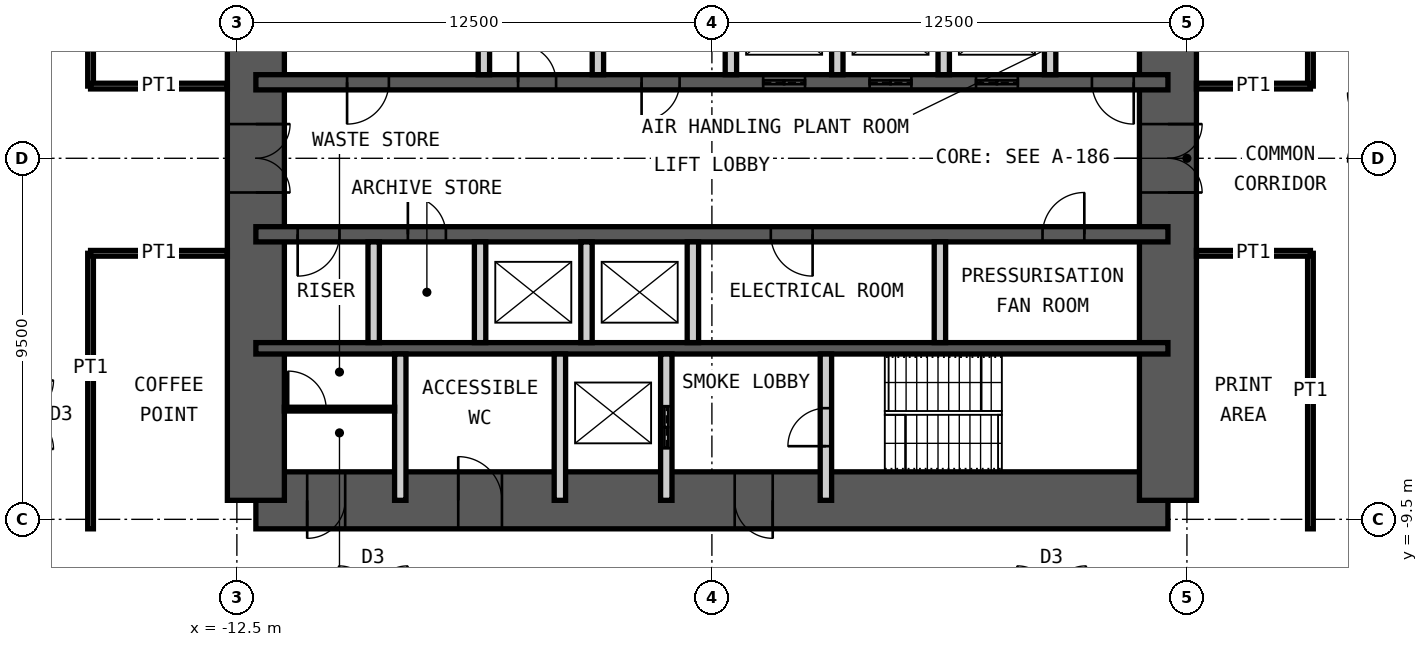
"""IFC4 building model, lengths in metres.
Left out: names, types, materials, properties, quantities, classifications, styles, units other than length and angle.
Written with IfcOpenShell. Run it as: python <this file> out.ifc"""

import sys

from ifc_helpers import new_model, si_unit, direction, frame, frame_2d, origin, place, context, subcontext, project, spatial, rectangle, extrude, element, fill, save


model = new_model("IFC4")
c1 = context("Model", 3, precision=1e-05, world=origin(), true_north=direction((0.0, 1.0)))
c2 = subcontext(c1, "Body", "Model", "MODEL_VIEW")
j1 = project(units=[si_unit("LENGTHUNIT", "METRE"), si_unit("PLANEANGLEUNIT", "RADIAN")], contexts=[c1])
p1 = place(None, origin())
s1 = spatial("IfcSite", under=j1, at=p1, CompositionType="ELEMENT")
p2 = place(p1, origin())
s2 = spatial("IfcBuilding", under=s1, at=p2, CompositionType="ELEMENT")
p3 = place(p2, frame((0.0, 0.0, 145.0)))
s3 = spatial("IfcBuildingStorey", under=s2, at=p3, CompositionType="ELEMENT", Elevation=145.0)
p4 = place(p3, frame((-12.0, -9.0, 0.0), z_axis=(0.0, 0.0, 1.0), x_axis=(1.0, 0.0, 0.0)))
e1 = element("IfcWall", 1, at=p4, inside=s3, PredefinedType="SHEAR", context=c2, shape_type="SweptSolid", body=[
    extrude(rectangle(XDim=24.0, YDim=1.5, at=frame_2d((12.0, 0.0))), origin(), (0.0, 0.0, 1.0), 4.2),
])
p5 = place(p4, frame((1.35, 0.0, 0.0)))
e2 = element("IfcOpeningElement", 2, at=p5, cuts=e1, PredefinedType="OPENING", context=c2, shape_type="SweptSolid", body=[
    extrude(rectangle(XDim=1.0, YDim=2.1, at=frame_2d((0.5, 1.05))), frame((0.0, 0.76, 0.0), z_axis=(0.0, -1.0, 0.0), x_axis=(1.0, 0.0, 0.0)), (0.0, 0.0, 1.0), 1.52),
])
p6 = place(p4, frame((5.325, 0.0, 0.0)))
e3 = element("IfcOpeningElement", 3, at=p6, cuts=e1, PredefinedType="OPENING", context=c2, shape_type="SweptSolid", body=[
    extrude(rectangle(XDim=1.15, YDim=2.1, at=frame_2d((0.575, 1.05))), frame((0.0, 0.76, 0.0), z_axis=(0.0, -1.0, 0.0), x_axis=(1.0, 0.0, 0.0)), (0.0, 0.0, 1.0), 1.52),
])
p7 = place(p4, frame((12.6, 0.0, 0.0)))
e4 = element("IfcOpeningElement", 4, at=p7, cuts=e1, PredefinedType="OPENING", context=c2, shape_type="SweptSolid", body=[
    extrude(rectangle(XDim=1.0, YDim=2.1, at=frame_2d((0.5, 1.05))), frame((0.0, 0.76, 0.0), z_axis=(0.0, -1.0, 0.0), x_axis=(1.0, 0.0, 0.0)), (0.0, 0.0, 1.0), 1.52),
])
p8 = place(p3, frame((12.0, -9.0, 0.0), z_axis=(0.0, 0.0, 1.0), x_axis=(0.0, 1.0, 0.0)))
e5 = element("IfcWall", 5, at=p8, inside=s3, PredefinedType="SHEAR", context=c2, shape_type="SweptSolid", body=[
    extrude(rectangle(XDim=18.0, YDim=1.5, at=frame_2d((9.0, 0.0))), origin(), (0.0, 0.0, 1.0), 4.2),
])
p9 = place(p8, frame((8.1, 0.0, 0.0)))
e6 = element("IfcOpeningElement", 6, at=p9, cuts=e5, PredefinedType="OPENING", context=c2, shape_type="SweptSolid", body=[
    extrude(rectangle(XDim=1.8, YDim=2.1, at=frame_2d((0.9, 1.05))), frame((0.0, 0.76, 0.0), z_axis=(0.0, -1.0, 0.0), x_axis=(1.0, 0.0, 0.0)), (0.0, 0.0, 1.0), 1.52),
])
p10 = place(p3, frame((-12.0, -9.0, 0.0), z_axis=(0.0, 0.0, 1.0), x_axis=(0.0, 1.0, 0.0)))
e7 = element("IfcWall", 7, at=p10, inside=s3, PredefinedType="SHEAR", context=c2, shape_type="SweptSolid", body=[
    extrude(rectangle(XDim=18.0, YDim=1.5, at=frame_2d((9.0, 0.0))), origin(), (0.0, 0.0, 1.0), 4.2),
])
p11 = place(p10, frame((8.1, 0.0, 0.0)))
e8 = element("IfcOpeningElement", 8, at=p11, cuts=e7, PredefinedType="OPENING", context=c2, shape_type="SweptSolid", body=[
    extrude(rectangle(XDim=1.8, YDim=2.1, at=frame_2d((0.9, 1.05))), frame((0.0, 0.76, 0.0), z_axis=(0.0, -1.0, 0.0), x_axis=(1.0, 0.0, 0.0)), (0.0, 0.0, 1.0), 1.52),
])
p12 = place(p3, frame((-12.0, 2.0, 0.0), z_axis=(0.0, 0.0, 1.0), x_axis=(1.0, 0.0, 0.0)))
e9 = element("IfcWall", 9, at=p12, inside=s3, PredefinedType="SHEAR", context=c2, shape_type="SweptSolid", body=[
    extrude(rectangle(XDim=24.0, YDim=0.4, at=frame_2d((12.0, 0.0))), origin(), (0.0, 0.0, 1.0), 4.2),
])
p13 = place(p12, frame((2.4, 0.0, 0.0)))
e10 = element("IfcOpeningElement", 10, at=p13, cuts=e9, PredefinedType="OPENING", context=c2, shape_type="SweptSolid", body=[
    extrude(rectangle(XDim=1.1, YDim=2.1, at=frame_2d((0.55, 1.05))), frame((0.0, 0.21, 0.0), z_axis=(0.0, -1.0, 0.0), x_axis=(1.0, 0.0, 0.0)), (0.0, 0.0, 1.0), 0.42),
])
p14 = place(p12, frame((22.0, 0.0, 0.0)))
e11 = element("IfcOpeningElement", 11, at=p14, cuts=e9, PredefinedType="OPENING", context=c2, shape_type="SweptSolid", body=[
    extrude(rectangle(XDim=1.1, YDim=2.1, at=frame_2d((0.55, 1.05))), frame((0.0, 0.21, 0.0), z_axis=(0.0, -1.0, 0.0), x_axis=(1.0, 0.0, 0.0)), (0.0, 0.0, 1.0), 0.42),
])
p15 = place(p12, frame((10.15, 0.0, 0.0)))
e12 = element("IfcOpeningElement", 12, at=p15, cuts=e9, PredefinedType="OPENING", context=c2, shape_type="SweptSolid", body=[
    extrude(rectangle(XDim=1.0, YDim=2.1, at=frame_2d((0.5, 1.05))), frame((0.0, 0.21, 0.0), z_axis=(0.0, -1.0, 0.0), x_axis=(1.0, 0.0, 0.0)), (0.0, 0.0, 1.0), 0.42),
])
p16 = place(p12, frame((6.9, 0.0, 0.0)))
e13 = element("IfcOpeningElement", 13, at=p16, cuts=e9, PredefinedType="OPENING", context=c2, shape_type="SweptSolid", body=[
    extrude(rectangle(XDim=1.0, YDim=2.1, at=frame_2d((0.5, 1.05))), frame((0.0, 0.21, 0.0), z_axis=(0.0, -1.0, 0.0), x_axis=(1.0, 0.0, 0.0)), (0.0, 0.0, 1.0), 0.42),
])
p17 = place(p12, frame((13.35, 0.0, 0.0)))
e14 = element("IfcOpeningElement", 14, at=p17, cuts=e9, PredefinedType="OPENING", context=c2, shape_type="SweptSolid", body=[
    extrude(rectangle(XDim=1.1, YDim=2.4, at=frame_2d((0.55, 1.2))), frame((0.0, 0.21, 0.0), z_axis=(0.0, -1.0, 0.0), x_axis=(1.0, 0.0, 0.0)), (0.0, 0.0, 1.0), 0.42),
])
p18 = place(p12, frame((16.15, 0.0, 0.0)))
e15 = element("IfcOpeningElement", 15, at=p18, cuts=e9, PredefinedType="OPENING", context=c2, shape_type="SweptSolid", body=[
    extrude(rectangle(XDim=1.1, YDim=2.4, at=frame_2d((0.55, 1.2))), frame((0.0, 0.21, 0.0), z_axis=(0.0, -1.0, 0.0), x_axis=(1.0, 0.0, 0.0)), (0.0, 0.0, 1.0), 0.42),
])
p19 = place(p12, frame((18.95, 0.0, 0.0)))
e16 = element("IfcOpeningElement", 16, at=p19, cuts=e9, PredefinedType="OPENING", context=c2, shape_type="SweptSolid", body=[
    extrude(rectangle(XDim=1.1, YDim=2.4, at=frame_2d((0.55, 1.2))), frame((0.0, 0.21, 0.0), z_axis=(0.0, -1.0, 0.0), x_axis=(1.0, 0.0, 0.0)), (0.0, 0.0, 1.0), 0.42),
])
p20 = place(p3, frame((-12.0, -2.0, 0.0), z_axis=(0.0, 0.0, 1.0), x_axis=(1.0, 0.0, 0.0)))
e17 = element("IfcWall", 17, at=p20, inside=s3, PredefinedType="SHEAR", context=c2, shape_type="SweptSolid", body=[
    extrude(rectangle(XDim=24.0, YDim=0.4, at=frame_2d((12.0, 0.0))), origin(), (0.0, 0.0, 1.0), 4.2),
])
p21 = place(p20, frame((1.1, 0.0, 0.0)))
e18 = element("IfcOpeningElement", 18, at=p21, cuts=e17, PredefinedType="OPENING", context=c2, shape_type="SweptSolid", body=[
    extrude(rectangle(XDim=1.1, YDim=2.1, at=frame_2d((0.55, 1.05))), frame((0.0, 0.21, 0.0), z_axis=(0.0, -1.0, 0.0), x_axis=(1.0, 0.0, 0.0)), (0.0, 0.0, 1.0), 0.42),
])
p22 = place(p20, frame((13.55, 0.0, 0.0)))
e19 = element("IfcOpeningElement", 19, at=p22, cuts=e17, PredefinedType="OPENING", context=c2, shape_type="SweptSolid", body=[
    extrude(rectangle(XDim=1.1, YDim=2.1, at=frame_2d((0.55, 1.05))), frame((0.0, 0.21, 0.0), z_axis=(0.0, -1.0, 0.0), x_axis=(1.0, 0.0, 0.0)), (0.0, 0.0, 1.0), 0.42),
])
p23 = place(p20, frame((20.7, 0.0, 0.0)))
e20 = element("IfcOpeningElement", 20, at=p23, cuts=e17, PredefinedType="OPENING", context=c2, shape_type="SweptSolid", body=[
    extrude(rectangle(XDim=1.1, YDim=2.1, at=frame_2d((0.55, 1.05))), frame((0.0, 0.21, 0.0), z_axis=(0.0, -1.0, 0.0), x_axis=(1.0, 0.0, 0.0)), (0.0, 0.0, 1.0), 0.42),
])
p24 = place(p20, frame((4.0, 0.0, 0.0)))
e21 = element("IfcOpeningElement", 21, at=p24, cuts=e17, PredefinedType="OPENING", context=c2, shape_type="SweptSolid", body=[
    extrude(rectangle(XDim=1.0, YDim=2.1, at=frame_2d((0.5, 1.05))), frame((0.0, 0.21, 0.0), z_axis=(0.0, -1.0, 0.0), x_axis=(1.0, 0.0, 0.0)), (0.0, 0.0, 1.0), 0.42),
])
p25 = place(p3, frame((-12.0, -5.0, 0.0), z_axis=(0.0, 0.0, 1.0), x_axis=(1.0, 0.0, 0.0)))
e22 = element("IfcWall", 22, at=p25, inside=s3, PredefinedType="SHEAR", context=c2, shape_type="SweptSolid", body=[
    extrude(rectangle(XDim=24.0, YDim=0.3, at=frame_2d((12.0, 0.0))), origin(), (0.0, 0.0, 1.0), 4.2),
])
for number, where, z_axis, x_axis in (
    (23, (-6.0, 2.2, 0.0), (0.0, 0.0, 1.0), (0.0, 1.0, 0.0)),
    (24, (-3.0, 2.2, 0.0), (0.0, 0.0, 1.0), (0.0, 1.0, 0.0)),
    (25, (0.5, 2.2, 0.0), (0.0, 0.0, 1.0), (0.0, 1.0, 0.0)),
    (26, (3.3, 2.2, 0.0), (0.0, 0.0, 1.0), (0.0, 1.0, 0.0)),
    (27, (6.1, 2.2, 0.0), (0.0, 0.0, 1.0), (0.0, 1.0, 0.0)),
    (28, (8.9, 2.2, 0.0), (0.0, 0.0, 1.0), (0.0, 1.0, 0.0)),
    (29, (-8.9, -4.85, 0.0), (0.0, 0.0, 1.0), (0.0, 1.0, 0.0)),
    (30, (-6.1, -4.85, 0.0), (0.0, 0.0, 1.0), (0.0, 1.0, 0.0)),
    (31, (-3.3, -4.85, 0.0), (0.0, 0.0, 1.0), (0.0, 1.0, 0.0)),
    (32, (-0.5, -4.85, 0.0), (0.0, 0.0, 1.0), (0.0, 1.0, 0.0)),
    (33, (6.0, -4.85, 0.0), (0.0, 0.0, 1.0), (0.0, 1.0, 0.0)),
):
    element("IfcWall", number, at=place(p3, frame(where, z_axis=z_axis, x_axis=x_axis)), inside=s3, PredefinedType="PARTITIONING", context=c2, shape_type="SweptSolid", body=[
        extrude(rectangle(XDim=2.65, YDim=0.3, at=frame_2d((1.325, 0.0))), origin(), (0.0, 0.0, 1.0), 3.98),
    ])
for number, where, z_axis, x_axis in (
    (34, (-8.2, -9.0, 0.0), (0.0, 0.0, 1.0), (0.0, 1.0, 0.0)),
    (35, (-4.0, -9.0, 0.0), (0.0, 0.0, 1.0), (0.0, 1.0, 0.0)),
):
    element("IfcWall", number, at=place(p3, frame(where, z_axis=z_axis, x_axis=x_axis)), inside=s3, PredefinedType="PARTITIONING", context=c2, shape_type="SweptSolid", body=[
        extrude(rectangle(XDim=3.85, YDim=0.3, at=frame_2d((1.925, 0.0))), origin(), (0.0, 0.0, 1.0), 3.98),
    ])
p26 = place(p3, frame((-1.2, -9.0, 0.0), z_axis=(0.0, 0.0, 1.0), x_axis=(0.0, 1.0, 0.0)))
e36 = element("IfcWall", 36, at=p26, inside=s3, PredefinedType="PARTITIONING", context=c2, shape_type="SweptSolid", body=[
    extrude(rectangle(XDim=3.85, YDim=0.3, at=frame_2d((1.925, 0.0))), origin(), (0.0, 0.0, 1.0), 3.98),
])
p27 = place(p26, frame((1.375, 0.0, 0.0)))
e37 = element("IfcOpeningElement", 37, at=p27, cuts=e36, PredefinedType="OPENING", context=c2, shape_type="SweptSolid", body=[
    extrude(rectangle(XDim=1.1, YDim=2.4, at=frame_2d((0.55, 1.2))), frame((0.0, 0.16, 0.0), z_axis=(0.0, -1.0, 0.0), x_axis=(1.0, 0.0, 0.0)), (0.0, 0.0, 1.0), 0.32),
])
p28 = place(p3, frame((3.0, -9.0, 0.0), z_axis=(0.0, 0.0, 1.0), x_axis=(0.0, 1.0, 0.0)))
e38 = element("IfcWall", 38, at=p28, inside=s3, PredefinedType="PARTITIONING", context=c2, shape_type="SweptSolid", body=[
    extrude(rectangle(XDim=3.85, YDim=0.3, at=frame_2d((1.925, 0.0))), origin(), (0.0, 0.0, 1.0), 3.98),
])
p29 = place(p28, frame((1.425, 0.0, 0.0)))
e39 = element("IfcOpeningElement", 39, at=p29, cuts=e38, PredefinedType="OPENING", context=c2, shape_type="SweptSolid", body=[
    extrude(rectangle(XDim=1.0, YDim=2.1, at=frame_2d((0.5, 1.05))), frame((0.0, 0.16, 0.0), z_axis=(0.0, -1.0, 0.0), x_axis=(1.0, 0.0, 0.0)), (0.0, 0.0, 1.0), 0.32),
])
p30 = place(p3, frame((-11.25, -6.6, 0.0), z_axis=(0.0, 0.0, 1.0), x_axis=(1.0, 0.0, 0.0)))
e40 = element("IfcWall", 40, at=p30, inside=s3, PredefinedType="PARTITIONING", context=c2, shape_type="SweptSolid", body=[
    extrude(rectangle(XDim=2.9, YDim=0.1, at=frame_2d((1.45, 0.0))), origin(), (0.0, 0.0, 1.0), 3.98),
])
p31 = place(p30, frame((0.1, 0.0, 0.0)))
e41 = element("IfcOpeningElement", 41, at=p31, cuts=e40, PredefinedType="OPENING", context=c2, shape_type="SweptSolid", body=[
    extrude(rectangle(XDim=1.0, YDim=2.4, at=frame_2d((0.5, 1.2))), frame((0.0, 0.06, 0.0), z_axis=(0.0, -1.0, 0.0), x_axis=(1.0, 0.0, 0.0)), (0.0, 0.0, 1.0), 0.12),
])
p32 = place(p3, frame((15.75, 1.9, 0.0), z_axis=(0.0, 0.0, 1.0), x_axis=(0.0, 1.0, 0.0)))
e42 = element("IfcWall", 42, at=p32, inside=s3, PredefinedType="PARTITIONING", context=c2, shape_type="SweptSolid", body=[
    extrude(rectangle(XDim=7.85, YDim=0.15, at=frame_2d((3.925, 0.0))), origin(), (0.0, 0.0, 1.0), 4.03),
])
p33 = place(p3, frame((12.75, 1.9, 0.0), z_axis=(0.0, 0.0, 1.0), x_axis=(1.0, 0.0, 0.0)))
e43 = element("IfcWall", 43, at=p33, inside=s3, PredefinedType="PARTITIONING", context=c2, shape_type="SweptSolid", body=[
    extrude(rectangle(XDim=3.0, YDim=0.15, at=frame_2d((1.5, 0.0))), origin(), (0.0, 0.0, 1.0), 2.93),
])
p34 = place(p3, frame((15.75, -9.75, 0.0), z_axis=(0.0, 0.0, 1.0), x_axis=(0.0, 1.0, 0.0)))
e44 = element("IfcWall", 44, at=p34, inside=s3, PredefinedType="PARTITIONING", context=c2, shape_type="SweptSolid", body=[
    extrude(rectangle(XDim=7.25, YDim=0.15, at=frame_2d((3.625, 0.0))), origin(), (0.0, 0.0, 1.0), 4.03),
])
p35 = place(p3, frame((12.75, -2.5, 0.0), z_axis=(0.0, 0.0, 1.0), x_axis=(1.0, 0.0, 0.0)))
e45 = element("IfcWall", 45, at=p35, inside=s3, PredefinedType="PARTITIONING", context=c2, shape_type="SweptSolid", body=[
    extrude(rectangle(XDim=3.0, YDim=0.15, at=frame_2d((1.5, 0.0))), origin(), (0.0, 0.0, 1.0), 3.33),
])
p36 = place(p3, frame((-16.35, 1.9, 0.0), z_axis=(0.0, 0.0, 1.0), x_axis=(0.0, 1.0, 0.0)))
e46 = element("IfcWall", 46, at=p36, inside=s3, PredefinedType="PARTITIONING", context=c2, shape_type="SweptSolid", body=[
    extrude(rectangle(XDim=7.85, YDim=0.15, at=frame_2d((3.925, 0.0))), origin(), (0.0, 0.0, 1.0), 4.03),
])
p37 = place(p3, frame((-12.75, 1.9, 0.0), z_axis=(0.0, 0.0, 1.0), x_axis=(-1.0, 0.0, 0.0)))
e47 = element("IfcWall", 47, at=p37, inside=s3, PredefinedType="PARTITIONING", context=c2, shape_type="SweptSolid", body=[
    extrude(rectangle(XDim=3.6, YDim=0.15, at=frame_2d((1.8, 0.0))), origin(), (0.0, 0.0, 1.0), 3.33),
])
p38 = place(p3, frame((-16.35, -9.75, 0.0), z_axis=(0.0, 0.0, 1.0), x_axis=(0.0, 1.0, 0.0)))
e48 = element("IfcWall", 48, at=p38, inside=s3, PredefinedType="PARTITIONING", context=c2, shape_type="SweptSolid", body=[
    extrude(rectangle(XDim=7.25, YDim=0.15, at=frame_2d((3.625, 0.0))), origin(), (0.0, 0.0, 1.0), 4.03),
])
p39 = place(p3, frame((-12.75, -2.5, 0.0), z_axis=(0.0, 0.0, 1.0), x_axis=(-1.0, 0.0, 0.0)))
e49 = element("IfcWall", 49, at=p39, inside=s3, PredefinedType="PARTITIONING", context=c2, shape_type="SweptSolid", body=[
    extrude(rectangle(XDim=3.6, YDim=0.15, at=frame_2d((1.8, 0.0))), origin(), (0.0, 0.0, 1.0), 3.33),
])
p40 = place(p5, origin())
e50 = element("IfcDoor", 50, at=p40, inside=s3, OperationType="SINGLE_SWING_LEFT", PredefinedType="DOOR", context=c2, shape_type="SweptSolid", body=[
    extrude(rectangle(XDim=1.0, YDim=2.1, at=frame_2d((0.5, 1.05))), frame((0.0, 0.025, 0.0), z_axis=(0.0, -1.0, 0.0), x_axis=(1.0, 0.0, 0.0)), (0.0, 0.0, 1.0), 0.05),
])
fill(e2, e50)
p41 = place(p6, origin())
e51 = element("IfcDoor", 51, at=p41, inside=s3, OperationType="SINGLE_SWING_RIGHT", PredefinedType="DOOR", context=c2, shape_type="SweptSolid", body=[
    extrude(rectangle(XDim=1.15, YDim=2.1, at=frame_2d((0.575, 1.05))), frame((0.0, 0.025, 0.0), z_axis=(0.0, -1.0, 0.0), x_axis=(1.0, 0.0, 0.0)), (0.0, 0.0, 1.0), 0.05),
])
fill(e3, e51)
p42 = place(p7, origin())
e52 = element("IfcDoor", 52, at=p42, inside=s3, OperationType="SINGLE_SWING_RIGHT", PredefinedType="DOOR", context=c2, shape_type="SweptSolid", body=[
    extrude(rectangle(XDim=1.0, YDim=2.1, at=frame_2d((0.5, 1.05))), frame((0.0, 0.025, 0.0), z_axis=(0.0, -1.0, 0.0), x_axis=(1.0, 0.0, 0.0)), (0.0, 0.0, 1.0), 0.05),
])
fill(e4, e52)
p43 = place(p29, origin())
e53 = element("IfcDoor", 53, at=p43, inside=s3, OperationType="SINGLE_SWING_RIGHT", PredefinedType="DOOR", context=c2, shape_type="SweptSolid", body=[
    extrude(rectangle(XDim=1.0, YDim=2.1, at=frame_2d((0.5, 1.05))), frame((0.0, 0.025, 0.0), z_axis=(0.0, -1.0, 0.0), x_axis=(1.0, 0.0, 0.0)), (0.0, 0.0, 1.0), 0.05),
])
fill(e39, e53)
p44 = place(p13, origin())
e54 = element("IfcDoor", 54, at=p44, inside=s3, OperationType="SINGLE_SWING_LEFT", PredefinedType="DOOR", context=c2, shape_type="SweptSolid", body=[
    extrude(rectangle(XDim=1.1, YDim=2.1, at=frame_2d((0.55, 1.05))), frame((0.0, 0.025, 0.0), z_axis=(0.0, -1.0, 0.0), x_axis=(1.0, 0.0, 0.0)), (0.0, 0.0, 1.0), 0.05),
])
fill(e10, e54)
p45 = place(p21, origin())
e55 = element("IfcDoor", 55, at=p45, inside=s3, OperationType="SINGLE_SWING_LEFT", PredefinedType="DOOR", context=c2, shape_type="SweptSolid", body=[
    extrude(rectangle(XDim=1.1, YDim=2.1, at=frame_2d((0.55, 1.05))), frame((0.0, 0.025, 0.0), z_axis=(0.0, -1.0, 0.0), x_axis=(1.0, 0.0, 0.0)), (0.0, 0.0, 1.0), 0.05),
])
fill(e18, e55)
p46 = place(p14, origin())
e56 = element("IfcDoor", 56, at=p46, inside=s3, OperationType="SINGLE_SWING_RIGHT", PredefinedType="DOOR", context=c2, shape_type="SweptSolid", body=[
    extrude(rectangle(XDim=1.1, YDim=2.1, at=frame_2d((0.55, 1.05))), frame((0.0, 0.025, 0.0), z_axis=(0.0, -1.0, 0.0), x_axis=(1.0, 0.0, 0.0)), (0.0, 0.0, 1.0), 0.05),
])
fill(e11, e56)
p47 = place(p15, origin())
e57 = element("IfcDoor", 57, at=p47, inside=s3, OperationType="SINGLE_SWING_LEFT", PredefinedType="DOOR", context=c2, shape_type="SweptSolid", body=[
    extrude(rectangle(XDim=1.0, YDim=2.1, at=frame_2d((0.5, 1.05))), frame((0.0, 0.025, 0.0), z_axis=(0.0, -1.0, 0.0), x_axis=(1.0, 0.0, 0.0)), (0.0, 0.0, 1.0), 0.05),
])
fill(e12, e57)
p48 = place(p22, origin())
e58 = element("IfcDoor", 58, at=p48, inside=s3, OperationType="SINGLE_SWING_RIGHT", PredefinedType="DOOR", context=c2, shape_type="SweptSolid", body=[
    extrude(rectangle(XDim=1.1, YDim=2.1, at=frame_2d((0.55, 1.05))), frame((0.0, 0.025, 0.0), z_axis=(0.0, -1.0, 0.0), x_axis=(1.0, 0.0, 0.0)), (0.0, 0.0, 1.0), 0.05),
])
fill(e19, e58)
p49 = place(p23, origin())
e59 = element("IfcDoor", 59, at=p49, inside=s3, OperationType="SINGLE_SWING_LEFT", PredefinedType="DOOR", context=c2, shape_type="SweptSolid", body=[
    extrude(rectangle(XDim=1.1, YDim=2.1, at=frame_2d((0.55, 1.05))), frame((0.0, 0.025, 0.0), z_axis=(0.0, -1.0, 0.0), x_axis=(1.0, 0.0, 0.0)), (0.0, 0.0, 1.0), 0.05),
])
fill(e20, e59)
p50 = place(p9, origin())
e60 = element("IfcDoor", 60, at=p50, inside=s3, OperationType="DOUBLE_DOOR_DOUBLE_SWING", PredefinedType="DOOR", context=c2, shape_type="SweptSolid", body=[
    extrude(rectangle(XDim=1.8, YDim=2.1, at=frame_2d((0.9, 1.05))), frame((0.0, 0.025, 0.0), z_axis=(0.0, -1.0, 0.0), x_axis=(1.0, 0.0, 0.0)), (0.0, 0.0, 1.0), 0.05),
])
fill(e6, e60)
p51 = place(p11, origin())
e61 = element("IfcDoor", 61, at=p51, inside=s3, OperationType="DOUBLE_DOOR_DOUBLE_SWING", PredefinedType="DOOR", context=c2, shape_type="SweptSolid", body=[
    extrude(rectangle(XDim=1.8, YDim=2.1, at=frame_2d((0.9, 1.05))), frame((0.0, 0.025, 0.0), z_axis=(0.0, -1.0, 0.0), x_axis=(1.0, 0.0, 0.0)), (0.0, 0.0, 1.0), 0.05),
])
fill(e8, e61)
p52 = place(p27, origin())
e62 = element("IfcDoor", 62, at=p52, inside=s3, OperationType="DOUBLE_DOOR_SLIDING", PredefinedType="DOOR", context=c2, shape_type="SweptSolid", body=[
    extrude(rectangle(XDim=1.1, YDim=2.4, at=frame_2d((0.55, 1.2))), frame((0.0, 0.025, 0.0), z_axis=(0.0, -1.0, 0.0), x_axis=(1.0, 0.0, 0.0)), (0.0, 0.0, 1.0), 0.05),
])
fill(e37, e62)
p53 = place(p16, origin())
e63 = element("IfcDoor", 63, at=p53, inside=s3, OperationType="SINGLE_SWING_RIGHT", PredefinedType="DOOR", context=c2, shape_type="SweptSolid", body=[
    extrude(rectangle(XDim=1.0, YDim=2.1, at=frame_2d((0.5, 1.05))), frame((0.0, 0.025, 0.0), z_axis=(0.0, -1.0, 0.0), x_axis=(1.0, 0.0, 0.0)), (0.0, 0.0, 1.0), 0.05),
])
fill(e13, e63)
p54 = place(p17, origin())
e64 = element("IfcDoor", 64, at=p54, inside=s3, OperationType="DOUBLE_DOOR_SLIDING", PredefinedType="DOOR", context=c2, shape_type="SweptSolid", body=[
    extrude(rectangle(XDim=1.1, YDim=2.4, at=frame_2d((0.55, 1.2))), frame((0.0, 0.025, 0.0), z_axis=(0.0, -1.0, 0.0), x_axis=(1.0, 0.0, 0.0)), (0.0, 0.0, 1.0), 0.05),
])
fill(e14, e64)
p55 = place(p18, origin())
e65 = element("IfcDoor", 65, at=p55, inside=s3, OperationType="DOUBLE_DOOR_SLIDING", PredefinedType="DOOR", context=c2, shape_type="SweptSolid", body=[
    extrude(rectangle(XDim=1.1, YDim=2.4, at=frame_2d((0.55, 1.2))), frame((0.0, 0.025, 0.0), z_axis=(0.0, -1.0, 0.0), x_axis=(1.0, 0.0, 0.0)), (0.0, 0.0, 1.0), 0.05),
])
fill(e15, e65)
p56 = place(p19, origin())
e66 = element("IfcDoor", 66, at=p56, inside=s3, OperationType="DOUBLE_DOOR_SLIDING", PredefinedType="DOOR", context=c2, shape_type="SweptSolid", body=[
    extrude(rectangle(XDim=1.1, YDim=2.4, at=frame_2d((0.55, 1.2))), frame((0.0, 0.025, 0.0), z_axis=(0.0, -1.0, 0.0), x_axis=(1.0, 0.0, 0.0)), (0.0, 0.0, 1.0), 0.05),
])
fill(e16, e66)
p57 = place(p24, origin())
e67 = element("IfcDoor", 67, at=p57, inside=s3, OperationType="SINGLE_SWING_RIGHT", PredefinedType="DOOR", context=c2, shape_type="SweptSolid", body=[
    extrude(rectangle(XDim=1.0, YDim=2.1, at=frame_2d((0.5, 1.05))), frame((0.0, 0.025, 0.0), z_axis=(0.0, -1.0, 0.0), x_axis=(1.0, 0.0, 0.0)), (0.0, 0.0, 1.0), 0.05),
])
fill(e21, e67)
p58 = place(p31, origin())
e68 = element("IfcDoor", 68, at=p58, inside=s3, OperationType="SINGLE_SWING_RIGHT", PredefinedType="DOOR", context=c2, shape_type="SweptSolid", body=[
    extrude(rectangle(XDim=1.0, YDim=2.4, at=frame_2d((0.5, 1.2))), frame((0.0, 0.025, 0.0), z_axis=(0.0, -1.0, 0.0), x_axis=(1.0, 0.0, 0.0)), (0.0, 0.0, 1.0), 0.05),
])
fill(e41, e68)
save(model, sys.argv[1])
